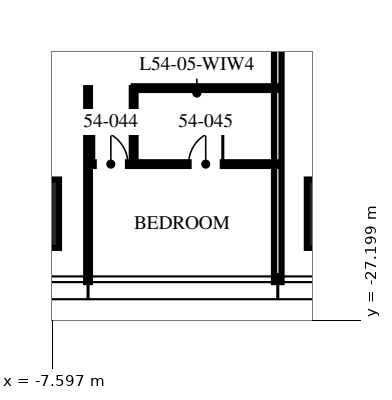
"""IFC4 building model, lengths in metres.
Left out: names, types, materials, properties, quantities, classifications, styles, units other than length and angle.
Written with IfcOpenShell. Run it as: python <this file> out.ifc"""

import sys

from ifc_helpers import new_model, si_unit, direction, frame, frame_2d, origin, origin_2d, place, context, subcontext, project, spatial, rectangle, extrude, element, fill, save


model = new_model("IFC4")
c1 = context("Model", 3, precision=1e-05, world=origin(), true_north=direction((0.0, 1.0)))
c2 = subcontext(c1, "Body", "Model", "MODEL_VIEW")
j1 = project(units=[si_unit("LENGTHUNIT", "METRE"), si_unit("PLANEANGLEUNIT", "RADIAN")], contexts=[c1])
p1 = place(None, origin())
s1 = spatial("IfcSite", under=j1, at=p1, CompositionType="ELEMENT")
p2 = place(p1, origin())
s2 = spatial("IfcBuilding", under=s1, at=p2, CompositionType="ELEMENT")
p3 = place(p2, frame((0.0, 0.0, 218.25)))
s3 = spatial("IfcBuildingStorey", under=s2, at=p3, CompositionType="ELEMENT", Elevation=218.25)
for number, where, z_axis, x_axis in (
    (1, (0.0, -24.4, 0.0), (0.0, 0.0, 1.0), (1.0, 0.0, 0.0)),
    (2, (-8.32, -24.4, 0.0), (0.0, 0.0, 1.0), (1.0, 0.0, 0.0)),
):
    element("IfcColumn", number, at=place(p3, frame(where, z_axis=z_axis, x_axis=x_axis)), inside=s3, PredefinedType="COLUMN", context=c2, shape_type="SweptSolid", body=[
        extrude(rectangle(XDim=1.8, YDim=1.8, at=origin_2d()), origin(), (0.0, 0.0, 1.0), 3.75),
    ])
p4 = place(p3, frame((-6.656, -21.095, 0.0), z_axis=(0.0, 0.0, 1.0), x_axis=(0.0, -1.0, 0.0)))
e3 = element("IfcWall", 3, at=p4, inside=s3, PredefinedType="PARTITIONING", context=c2, shape_type="SweptSolid", body=[
    extrude(rectangle(XDim=5.105, YDim=0.1, at=frame_2d((2.552, 0.0))), origin(), (0.0, 0.0, 1.0), 2.91),
])
p5 = place(p3, frame((-1.664, -12.8, 0.0), z_axis=(0.0, 0.0, 1.0), x_axis=(0.0, -1.0, 0.0)))
e4 = element("IfcWall", 4, at=p5, inside=s3, PredefinedType="PARTITIONING", context=c2, shape_type="SweptSolid", body=[
    extrude(rectangle(XDim=13.4, YDim=0.2, at=frame_2d((6.7, 0.0))), origin(), (0.0, 0.0, 1.0), 2.91),
])
p6 = place(p3, frame((-6.656, -23.095, 0.0), z_axis=(0.0, 0.0, 1.0), x_axis=(1.0, 0.0, 0.0)))
e5 = element("IfcWall", 5, at=p6, inside=s3, PredefinedType="PARTITIONING", context=c2, shape_type="SweptSolid", body=[
    extrude(rectangle(XDim=4.992, YDim=0.1, at=frame_2d((2.496, 0.0))), origin(), (0.0, 0.0, 1.0), 2.81),
])
p7 = place(p6, frame((0.15, 0.0, 0.0)))
e6 = element("IfcOpeningElement", 6, at=p7, cuts=e5, PredefinedType="OPENING", context=c2, shape_type="SweptSolid", body=[
    extrude(rectangle(XDim=0.9, YDim=2.1, at=frame_2d((0.45, 1.05))), frame((0.0, 0.06, 0.0), z_axis=(0.0, -1.0, 0.0), x_axis=(1.0, 0.0, 0.0)), (0.0, 0.0, 1.0), 0.12),
])
p8 = place(p6, frame((2.646, 0.0, 0.0)))
e7 = element("IfcOpeningElement", 7, at=p8, cuts=e5, PredefinedType="OPENING", context=c2, shape_type="SweptSolid", body=[
    extrude(rectangle(XDim=0.9, YDim=2.1, at=frame_2d((0.45, 1.05))), frame((0.0, 0.06, 0.0), z_axis=(0.0, -1.0, 0.0), x_axis=(1.0, 0.0, 0.0)), (0.0, 0.0, 1.0), 0.12),
])
p9 = place(p3, frame((-5.456, -21.095, 0.0), z_axis=(0.0, 0.0, 1.0), x_axis=(0.0, -1.0, 0.0)))
e8 = element("IfcWall", 8, at=p9, inside=s3, PredefinedType="PARTITIONING", context=c2, shape_type="SweptSolid", body=[
    extrude(rectangle(XDim=2.0, YDim=0.1, at=frame_2d((1.0, 0.0))), origin(), (0.0, 0.0, 1.0), 3.5),
])
p10 = place(p3, frame((-5.456, -21.095, 0.0), z_axis=(0.0, 0.0, 1.0), x_axis=(1.0, 0.0, 0.0)))
e9 = element("IfcWall", 9, at=p10, inside=s3, PredefinedType="PARTITIONING", context=c2, shape_type="SweptSolid", body=[
    extrude(rectangle(XDim=3.792, YDim=0.1, at=frame_2d((1.896, 0.0))), origin(), (0.0, 0.0, 1.0), 2.81),
])
p11 = place(p7, origin())
e10 = element("IfcDoor", 10, at=p11, inside=s3, OperationType="SINGLE_SWING_LEFT", PredefinedType="DOOR", context=c2, shape_type="SweptSolid", body=[
    extrude(rectangle(XDim=0.9, YDim=2.1, at=frame_2d((0.45, 1.05))), frame((0.0, 0.025, 0.0), z_axis=(0.0, -1.0, 0.0), x_axis=(1.0, 0.0, 0.0)), (0.0, 0.0, 1.0), 0.05),
])
fill(e6, e10)
p12 = place(p8, origin())
e11 = element("IfcDoor", 11, at=p12, inside=s3, OperationType="SINGLE_SWING_RIGHT", PredefinedType="DOOR", context=c2, shape_type="SweptSolid", body=[
    extrude(rectangle(XDim=0.9, YDim=2.1, at=frame_2d((0.45, 1.05))), frame((0.0, 0.025, 0.0), z_axis=(0.0, -1.0, 0.0), x_axis=(1.0, 0.0, 0.0)), (0.0, 0.0, 1.0), 0.05),
])
fill(e7, e11)
save(model, sys.argv[1])
